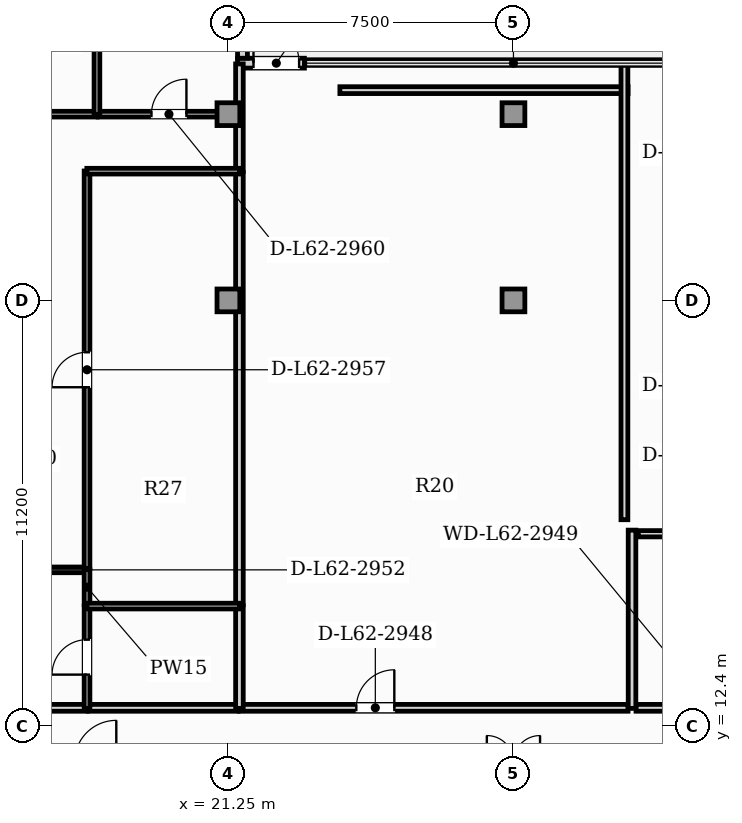
"""IFC4 building model, lengths in metres.
Left out: names, types, materials, properties, quantities, classifications, styles, units other than length and angle.
Written with IfcOpenShell. Run it as: python <this file> out.ifc"""

import sys

from ifc_helpers import new_model, si_unit, direction, frame, frame_2d, origin, origin_2d, place, context, subcontext, project, spatial, rectangle, extrude, element, fill, save


model = new_model("IFC4")
c1 = context("Model", 3, precision=1e-05, world=origin(), true_north=direction((0.0, 1.0)))
c2 = subcontext(c1, "Body", "Model", "MODEL_VIEW")
j1 = project(units=[si_unit("LENGTHUNIT", "METRE"), si_unit("PLANEANGLEUNIT", "RADIAN")], contexts=[c1])
p1 = place(None, origin())
s1 = spatial("IfcSite", under=j1, at=p1, CompositionType="ELEMENT")
p2 = place(p1, origin())
s2 = spatial("IfcBuilding", under=s1, at=p2, CompositionType="ELEMENT")
p3 = place(p2, frame((0.0, 0.0, 251.7)))
s3 = spatial("IfcBuildingStorey", under=s2, at=p3, CompositionType="ELEMENT", Elevation=251.7)
for number, where, z_axis, x_axis in (
    (1, (21.25, 23.6, 0.0), (0.0, 0.0, 1.0), (1.0, 0.0, 0.0)),
    (2, (28.75, 23.6, 0.0), (0.0, 0.0, 1.0), (1.0, 0.0, 0.0)),
    (3, (21.25, 28.5, 0.0), (0.0, 0.0, 1.0), (1.0, 0.0, 0.0)),
    (4, (28.75, 28.5, 0.0), (0.0, 0.0, 1.0), (1.0, 0.0, 0.0)),
):
    element("IfcColumn", number, at=place(p3, frame(where, z_axis=z_axis, x_axis=x_axis)), inside=s3, PredefinedType="COLUMN", context=c2, shape_type="SweptSolid", body=[
        extrude(rectangle(XDim=0.6, YDim=0.6, at=origin_2d()), origin(), (0.0, 0.0, 1.0), 5.05),
    ])
p4 = place(p3, frame((21.49, 29.842, 0.0), z_axis=(0.0, 0.0, 1.0), x_axis=(1.0, 0.0, 0.0)))
e5 = element("IfcWall", 5, at=p4, inside=s3, PredefinedType="SOLIDWALL", context=c2, shape_type="SweptSolid", body=[
    extrude(rectangle(XDim=1.76, YDim=0.26, at=frame_2d((0.88, 0.0))), origin(), (0.0, 0.0, 1.0), 4.85),
])
p5 = place(p4, frame((0.42, 0.0, 0.0)))
e6 = element("IfcOpeningElement", 6, at=p5, cuts=e5, PredefinedType="OPENING", context=c2, shape_type="SweptSolid", body=[
    extrude(rectangle(XDim=1.2, YDim=2.2, at=frame_2d((0.6, 1.1))), frame((0.0, 0.14, 0.0), z_axis=(0.0, -1.0, 0.0), x_axis=(1.0, 0.0, 0.0)), (0.0, 0.0, 1.0), 0.28),
])
p6 = place(p3, frame((21.62, 29.972, 0.0), z_axis=(0.0, 0.0, 1.0), x_axis=(0.0, 1.0, 0.0)))
e7 = element("IfcWall", 7, at=p6, inside=s3, PredefinedType="SOLIDWALL", context=c2, shape_type="SweptSolid", body=[
    extrude(rectangle(XDim=6.16, YDim=0.26, at=frame_2d((3.08, 0.0))), origin(), (0.0, 0.0, 1.0), 4.85),
])
p7 = place(p6, frame((2.33, 0.0, 0.9)))
e8 = element("IfcOpeningElement", 8, at=p7, cuts=e7, PredefinedType="OPENING", context=c2, shape_type="SweptSolid", body=[
    extrude(rectangle(XDim=1.5, YDim=1.95, at=frame_2d((0.75, 0.975))), frame((0.0, 0.14, 0.0), z_axis=(0.0, -1.0, 0.0), x_axis=(1.0, 0.0, 0.0)), (0.0, 0.0, 1.0), 0.28),
])
p8 = place(p3, frame((21.535, 12.88, 0.0), z_axis=(0.0, 0.0, 1.0), x_axis=(1.0, 0.0, 0.0)))
e9 = element("IfcWall", 9, at=p8, inside=s3, PredefinedType="PARTITIONING", context=c2, shape_type="SweptSolid", body=[
    extrude(rectangle(XDim=10.23, YDim=0.18, at=frame_2d((5.115, 0.0))), origin(), (0.0, 0.0, 1.0), 4.85),
])
p9 = place(p8, frame((3.081, 0.0, 0.0)))
e10 = element("IfcOpeningElement", 10, at=p9, cuts=e9, PredefinedType="OPENING", context=c2, shape_type="SweptSolid", body=[
    extrude(rectangle(XDim=1.0, YDim=2.15, at=frame_2d((0.5, 1.075))), frame((0.0, 0.1, 0.0), z_axis=(0.0, -1.0, 0.0), x_axis=(1.0, 0.0, 0.0)), (0.0, 0.0, 1.0), 0.2),
])
p10 = place(p3, frame((31.975, 12.88, 0.0), z_axis=(0.0, 0.0, 1.0), x_axis=(1.0, 0.0, 0.0)))
e11 = element("IfcWall", 11, at=p10, inside=s3, PredefinedType="PARTITIONING", context=c2, shape_type="SweptSolid", body=[
    extrude(rectangle(XDim=3.99, YDim=0.18, at=frame_2d((1.995, 0.0))), origin(), (0.0, 0.0, 1.0), 4.85),
])
p11 = place(p10, frame((1.47, 0.0, 0.0)))
e12 = element("IfcOpeningElement", 12, at=p11, cuts=e11, PredefinedType="OPENING", context=c2, shape_type="SweptSolid", body=[
    extrude(rectangle(XDim=1.05, YDim=2.15, at=frame_2d((0.525, 1.075))), frame((0.0, 0.1, 0.0), z_axis=(0.0, -1.0, 0.0), x_axis=(1.0, 0.0, 0.0)), (0.0, 0.0, 1.0), 0.2),
])
p12 = place(p3, frame((12.545, 12.88, 0.0), z_axis=(0.0, 0.0, 1.0), x_axis=(1.0, 0.0, 0.0)))
e13 = element("IfcWall", 13, at=p12, inside=s3, PredefinedType="PARTITIONING", context=c2, shape_type="SweptSolid", body=[
    extrude(rectangle(XDim=4.99, YDim=0.18, at=frame_2d((2.495, 0.0))), origin(), (0.0, 0.0, 1.0), 4.85),
])
p13 = place(p12, frame((1.995, 0.0, 0.0)))
e14 = element("IfcOpeningElement", 14, at=p13, cuts=e13, PredefinedType="OPENING", context=c2, shape_type="SweptSolid", body=[
    extrude(rectangle(XDim=1.0, YDim=2.15, at=frame_2d((0.5, 1.075))), frame((0.0, 0.1, 0.0), z_axis=(0.0, -1.0, 0.0), x_axis=(1.0, 0.0, 0.0)), (0.0, 0.0, 1.0), 0.2),
])
p14 = place(p3, frame((17.565, 12.88, 0.0), z_axis=(0.0, 0.0, 1.0), x_axis=(1.0, 0.0, 0.0)))
e15 = element("IfcWall", 15, at=p14, inside=s3, PredefinedType="PARTITIONING", context=c2, shape_type="SweptSolid", body=[
    extrude(rectangle(XDim=3.94, YDim=0.18, at=frame_2d((1.97, 0.0))), origin(), (0.0, 0.0, 1.0), 4.85),
])
p15 = place(p3, frame((31.87, 12.865, 0.0), z_axis=(0.0, 0.0, 1.0), x_axis=(0.0, 1.0, 0.0)))
e16 = element("IfcWall", 16, at=p15, inside=s3, PredefinedType="PARTITIONING", context=c2, shape_type="SweptSolid", body=[
    extrude(rectangle(XDim=4.69, YDim=0.2, at=frame_2d((2.345, 0.0))), origin(), (0.0, 0.0, 1.0), 4.85),
])
p16 = place(p3, frame((21.54, 26.995, 0.0), z_axis=(0.0, 0.0, 1.0), x_axis=(0.0, 1.0, 0.0)))
e17 = element("IfcWall", 17, at=p16, inside=s3, PredefinedType="PARTITIONING", context=c2, shape_type="SweptSolid", body=[
    extrude(rectangle(XDim=2.827, YDim=0.2, at=frame_2d((1.414, 0.0))), origin(), (0.0, 0.0, 1.0), 4.85),
])
p17 = place(p3, frame((21.54, 12.865, 0.0), z_axis=(0.0, 0.0, 1.0), x_axis=(0.0, 1.0, 0.0)))
e18 = element("IfcWall", 18, at=p17, inside=s3, PredefinedType="PARTITIONING", context=c2, shape_type="SweptSolid", body=[
    extrude(rectangle(XDim=2.697, YDim=0.2, at=frame_2d((1.348, 0.0))), origin(), (0.0, 0.0, 1.0), 4.85),
])
p18 = place(p3, frame((21.54, 15.592, 0.0), z_axis=(0.0, 0.0, 1.0), x_axis=(0.0, 1.0, 0.0)))
e19 = element("IfcWall", 19, at=p18, inside=s3, PredefinedType="PARTITIONING", context=c2, shape_type="SweptSolid", body=[
    extrude(rectangle(XDim=11.374, YDim=0.2, at=frame_2d((5.687, 0.0))), origin(), (0.0, 0.0, 1.0), 4.85),
])
p19 = place(p3, frame((12.545, 16.51, 0.0), z_axis=(0.0, 0.0, 1.0), x_axis=(1.0, 0.0, 0.0)))
e20 = element("IfcWall", 20, at=p19, inside=s3, PredefinedType="PARTITIONING", context=c2, shape_type="SweptSolid", body=[
    extrude(rectangle(XDim=4.99, YDim=0.15, at=frame_2d((2.495, 0.0))), origin(), (0.0, 0.0, 1.0), 4.85),
])
p20 = place(p19, frame((2.035, 0.0, 0.0)))
e21 = element("IfcOpeningElement", 21, at=p20, cuts=e20, PredefinedType="OPENING", context=c2, shape_type="SweptSolid", body=[
    extrude(rectangle(XDim=0.92, YDim=2.1, at=frame_2d((0.46, 1.05))), frame((0.0, 0.085, 0.0), z_axis=(0.0, -1.0, 0.0), x_axis=(1.0, 0.0, 0.0)), (0.0, 0.0, 1.0), 0.17),
])
p21 = place(p3, frame((17.53, 12.865, 0.0), z_axis=(0.0, 0.0, 1.0), x_axis=(0.0, 1.0, 0.0)))
e22 = element("IfcWall", 22, at=p21, inside=s3, PredefinedType="PARTITIONING", context=c2, shape_type="SweptSolid", body=[
    extrude(rectangle(XDim=2.697, YDim=0.15, at=frame_2d((1.348, 0.0))), origin(), (0.0, 0.0, 1.0), 4.85),
])
p22 = place(p21, frame((0.888, 0.0, 0.0)))
e23 = element("IfcOpeningElement", 23, at=p22, cuts=e22, PredefinedType="OPENING", context=c2, shape_type="SweptSolid", body=[
    extrude(rectangle(XDim=0.92, YDim=2.1, at=frame_2d((0.46, 1.05))), frame((0.0, 0.085, 0.0), z_axis=(0.0, -1.0, 0.0), x_axis=(1.0, 0.0, 0.0)), (0.0, 0.0, 1.0), 0.17),
])
p23 = place(p3, frame((17.53, 15.592, 0.0), z_axis=(0.0, 0.0, 1.0), x_axis=(0.0, 1.0, 0.0)))
e24 = element("IfcWall", 24, at=p23, inside=s3, PredefinedType="PARTITIONING", context=c2, shape_type="SweptSolid", body=[
    extrude(rectangle(XDim=0.923, YDim=0.15, at=frame_2d((0.462, 0.0))), origin(), (0.0, 0.0, 1.0), 4.85),
])
p24 = place(p3, frame((17.53, 16.545, 0.0), z_axis=(0.0, 0.0, 1.0), x_axis=(0.0, 1.0, 0.0)))
e25 = element("IfcWall", 25, at=p24, inside=s3, PredefinedType="PARTITIONING", context=c2, shape_type="SweptSolid", body=[
    extrude(rectangle(XDim=10.46, YDim=0.15, at=frame_2d((5.23, 0.0))), origin(), (0.0, 0.0, 1.0), 4.85),
])
p25 = place(p24, frame((4.77, 0.0, 0.0)))
e26 = element("IfcOpeningElement", 26, at=p25, cuts=e25, PredefinedType="OPENING", context=c2, shape_type="SweptSolid", body=[
    extrude(rectangle(XDim=0.92, YDim=2.1, at=frame_2d((0.46, 1.05))), frame((0.0, 0.085, 0.0), z_axis=(0.0, -1.0, 0.0), x_axis=(1.0, 0.0, 0.0)), (0.0, 0.0, 1.0), 0.17),
])
p26 = place(p3, frame((17.525, 27.0, 0.0), z_axis=(0.0, 0.0, 1.0), x_axis=(1.0, 0.0, 0.0)))
e27 = element("IfcWall", 27, at=p26, inside=s3, PredefinedType="PARTITIONING", context=c2, shape_type="SweptSolid", body=[
    extrude(rectangle(XDim=4.02, YDim=0.15, at=frame_2d((2.01, 0.0))), origin(), (0.0, 0.0, 1.0), 4.85),
])
p27 = place(p3, frame((13.785, 28.5, 0.0), z_axis=(0.0, 0.0, 1.0), x_axis=(1.0, 0.0, 0.0)))
e28 = element("IfcWall", 28, at=p27, inside=s3, PredefinedType="PARTITIONING", context=c2, shape_type="SweptSolid", body=[
    extrude(rectangle(XDim=4.011, YDim=0.15, at=frame_2d((2.005, 0.0))), origin(), (0.0, 0.0, 1.0), 4.306),
])
p28 = place(p27, frame((1.545, 0.0, 0.0)))
e29 = element("IfcOpeningElement", 29, at=p28, cuts=e28, PredefinedType="OPENING", context=c2, shape_type="SweptSolid", body=[
    extrude(rectangle(XDim=0.92, YDim=2.1, at=frame_2d((0.46, 1.05))), frame((0.0, 0.085, 0.0), z_axis=(0.0, -1.0, 0.0), x_axis=(1.0, 0.0, 0.0)), (0.0, 0.0, 1.0), 0.17),
])
p29 = place(p3, frame((17.826, 28.5, 0.0), z_axis=(0.0, 0.0, 1.0), x_axis=(1.0, 0.0, 0.0)))
e30 = element("IfcWall", 30, at=p29, inside=s3, PredefinedType="PARTITIONING", context=c2, shape_type="SweptSolid", body=[
    extrude(rectangle(XDim=3.719, YDim=0.15, at=frame_2d((1.86, 0.0))), origin(), (0.0, 0.0, 1.0), 4.306),
])
p30 = place(p29, frame((1.4, 0.0, 0.0)))
e31 = element("IfcOpeningElement", 31, at=p30, cuts=e30, PredefinedType="OPENING", context=c2, shape_type="SweptSolid", body=[
    extrude(rectangle(XDim=0.92, YDim=2.1, at=frame_2d((0.46, 1.05))), frame((0.0, 0.085, 0.0), z_axis=(0.0, -1.0, 0.0), x_axis=(1.0, 0.0, 0.0)), (0.0, 0.0, 1.0), 0.17),
])
p31 = place(p3, frame((17.525, 15.556, 0.0), z_axis=(0.0, 0.0, 1.0), x_axis=(1.0, 0.0, 0.0)))
e32 = element("IfcWall", 32, at=p31, inside=s3, PredefinedType="PARTITIONING", context=c2, shape_type="SweptSolid", body=[
    extrude(rectangle(XDim=4.02, YDim=0.15, at=frame_2d((2.01, 0.0))), origin(), (0.0, 0.0, 1.0), 4.85),
])
p32 = place(p3, frame((17.791, 28.495, 0.0), z_axis=(0.0, 0.0, 1.0), x_axis=(0.0, 1.0, 0.0)))
e33 = element("IfcWall", 33, at=p32, inside=s3, PredefinedType="PARTITIONING", context=c2, shape_type="SweptSolid", body=[
    extrude(rectangle(XDim=7.527, YDim=0.15, at=frame_2d((3.764, 0.0))), origin(), (0.0, 0.0, 1.0), 4.85),
])
p33 = place(p3, frame((24.183, 29.132, 0.0), z_axis=(0.0, 0.0, 1.0), x_axis=(1.0, 0.0, 0.0)))
e34 = element("IfcWall", 34, at=p33, inside=s3, PredefinedType="PARTITIONING", context=c2, shape_type="SweptSolid", body=[
    extrude(rectangle(XDim=7.582, YDim=0.18, at=frame_2d((3.791, 0.0))), origin(), (0.0, 0.0, 1.0), 4.85),
])
p34 = place(p3, frame((31.67, 29.824, 0.0), z_axis=(0.0, 0.0, 1.0), x_axis=(0.0, -1.0, 0.0)))
e35 = element("IfcWall", 35, at=p34, inside=s3, PredefinedType="PARTITIONING", context=c2, shape_type="SweptSolid", body=[
    extrude(rectangle(XDim=11.995, YDim=0.18, at=frame_2d((5.998, 0.0))), origin(), (0.0, 0.0, 1.0), 4.85),
])
p35 = place(p3, frame((32.035, 17.46, 0.0), z_axis=(0.0, 0.0, 1.0), x_axis=(1.0, 0.0, 0.0)))
e36 = element("IfcWall", 36, at=p35, inside=s3, PredefinedType="PLUMBINGWALL", context=c2, shape_type="SweptSolid", body=[
    extrude(rectangle(XDim=3.76, YDim=0.165, at=frame_2d((1.88, 0.0))), origin(), (0.0, 0.0, 1.0), 4.85),
])
p36 = place(p5, origin())
e37 = element("IfcDoor", 37, at=p36, inside=s3, OperationType="SINGLE_SWING_LEFT", PredefinedType="DOOR", context=c2, shape_type="SweptSolid", body=[
    extrude(rectangle(XDim=1.2, YDim=2.2, at=frame_2d((0.6, 1.1))), frame((0.0, 0.025, 0.0), z_axis=(0.0, -1.0, 0.0), x_axis=(1.0, 0.0, 0.0)), (0.0, 0.0, 1.0), 0.05),
])
fill(e6, e37)
p37 = place(p9, origin())
e38 = element("IfcDoor", 38, at=p37, inside=s3, OperationType="SINGLE_SWING_RIGHT", PredefinedType="DOOR", context=c2, shape_type="SweptSolid", body=[
    extrude(rectangle(XDim=1.0, YDim=2.15, at=frame_2d((0.5, 1.075))), frame((0.0, 0.025, 0.0), z_axis=(0.0, -1.0, 0.0), x_axis=(1.0, 0.0, 0.0)), (0.0, 0.0, 1.0), 0.05),
])
fill(e10, e38)
p38 = place(p22, origin())
e39 = element("IfcDoor", 39, at=p38, inside=s3, OperationType="SINGLE_SWING_LEFT", PredefinedType="DOOR", context=c2, shape_type="SweptSolid", body=[
    extrude(rectangle(XDim=0.92, YDim=2.1, at=frame_2d((0.46, 1.05))), frame((0.0, 0.025, 0.0), z_axis=(0.0, -1.0, 0.0), x_axis=(1.0, 0.0, 0.0)), (0.0, 0.0, 1.0), 0.05),
])
fill(e23, e39)
p39 = place(p25, origin())
e40 = element("IfcDoor", 40, at=p39, inside=s3, OperationType="SINGLE_SWING_LEFT", PredefinedType="DOOR", context=c2, shape_type="SweptSolid", body=[
    extrude(rectangle(XDim=0.92, YDim=2.1, at=frame_2d((0.46, 1.05))), frame((0.0, 0.025, 0.0), z_axis=(0.0, -1.0, 0.0), x_axis=(1.0, 0.0, 0.0)), (0.0, 0.0, 1.0), 0.05),
])
fill(e26, e40)
p40 = place(p30, origin())
e41 = element("IfcDoor", 41, at=p40, inside=s3, OperationType="SINGLE_SWING_RIGHT", PredefinedType="DOOR", context=c2, shape_type="SweptSolid", body=[
    extrude(rectangle(XDim=0.92, YDim=2.1, at=frame_2d((0.46, 1.05))), frame((0.0, 0.025, 0.0), z_axis=(0.0, -1.0, 0.0), x_axis=(1.0, 0.0, 0.0)), (0.0, 0.0, 1.0), 0.05),
])
fill(e31, e41)
save(model, sys.argv[1])
